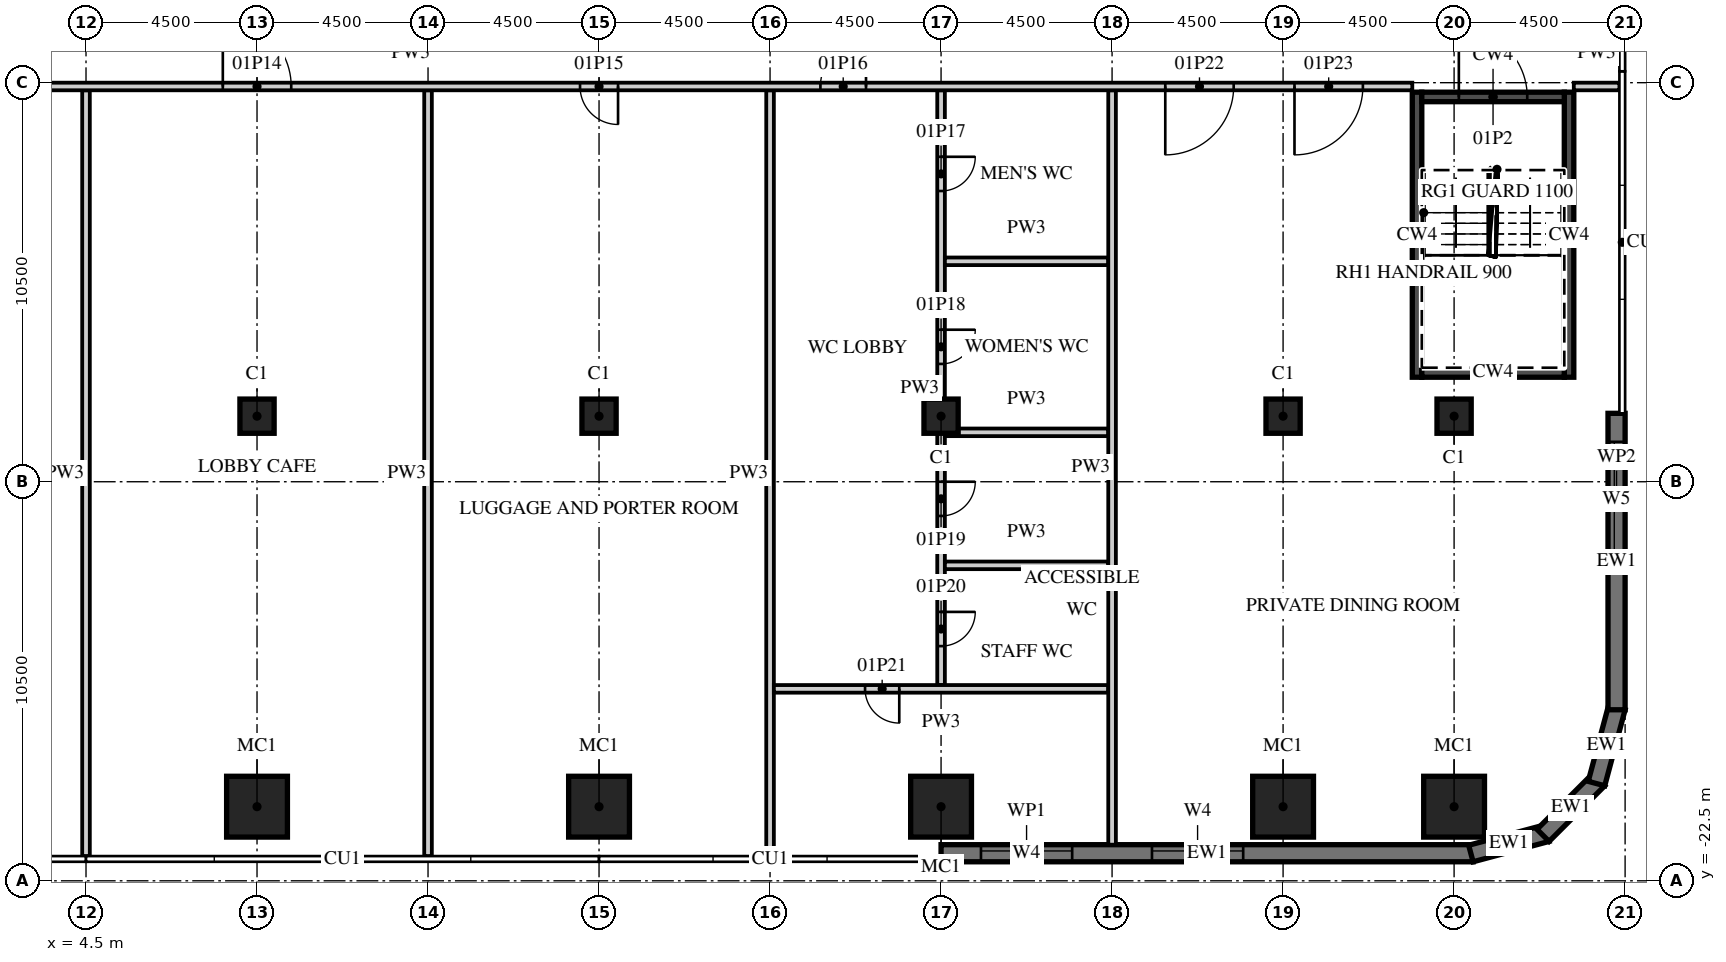
"""IFC4 building model, lengths in metres.
Left out: names, types, materials, properties, quantities, classifications, styles, units other than length and angle.
Written with IfcOpenShell. Run it as: python <this file> out.ifc"""

import sys

from ifc_helpers import new_model, si_unit, direction, frame, frame_2d, origin, origin_2d, place, context, subcontext, project, spatial, polyline, rectangle, outline, extrude, element, fill, save


model = new_model("IFC4")
c1 = context("Model", 3, precision=1e-05, world=origin(), true_north=direction((0.0, 1.0)))
c2 = subcontext(c1, "Body", "Model", "MODEL_VIEW")
j1 = project(units=[si_unit("LENGTHUNIT", "METRE"), si_unit("PLANEANGLEUNIT", "RADIAN")], contexts=[c1])
p1 = place(None, origin())
s1 = spatial("IfcSite", under=j1, at=p1, CompositionType="ELEMENT")
p2 = place(p1, origin())
s2 = spatial("IfcBuilding", under=s1, at=p2, CompositionType="ELEMENT")
p3 = place(p2, frame((0.0, 0.0, 11.0)))
s3 = spatial("IfcBuildingStorey", under=s2, at=p3, CompositionType="ELEMENT", Elevation=11.0)
for number, where, z_axis, x_axis in (
    (1, (9.0, -20.55, 0.0), (0.0, 0.0, 1.0), (1.0, 0.0, 0.0)),
    (2, (18.0, -20.55, 0.0), (0.0, 0.0, 1.0), (1.0, 0.0, 0.0)),
    (3, (27.0, -20.55, 0.0), (0.0, 0.0, 1.0), (1.0, 0.0, 0.0)),
    (4, (36.0, -20.55, 0.0), (0.0, 0.0, 1.0), (1.0, 0.0, 0.0)),
    (5, (40.5, -20.55, 0.0), (0.0, 0.0, 1.0), (1.0, 0.0, 0.0)),
):
    element("IfcColumn", number, at=place(p3, frame(where, z_axis=z_axis, x_axis=x_axis)), inside=s3, PredefinedType="COLUMN", context=c2, shape_type="SweptSolid", body=[
        extrude(rectangle(XDim=1.6, YDim=1.6, at=origin_2d()), origin(), (0.0, 0.0, 1.0), 6.0),
    ])
for number, where, z_axis, x_axis in (
    (6, (9.0, -10.275, 0.0), (0.0, 0.0, 1.0), (1.0, 0.0, 0.0)),
    (7, (18.0, -10.275, 0.0), (0.0, 0.0, 1.0), (1.0, 0.0, 0.0)),
    (8, (27.0, -10.275, 0.0), (0.0, 0.0, 1.0), (1.0, 0.0, 0.0)),
    (9, (36.0, -10.275, 0.0), (0.0, 0.0, 1.0), (1.0, 0.0, 0.0)),
    (10, (40.5, -10.275, 0.0), (0.0, 0.0, 1.0), (1.0, 0.0, 0.0)),
):
    element("IfcColumn", number, at=place(p3, frame(where, z_axis=z_axis, x_axis=x_axis)), inside=s3, PredefinedType="COLUMN", context=c2, shape_type="SweptSolid", body=[
        extrude(rectangle(XDim=0.9, YDim=0.9, at=origin_2d()), origin(), (0.0, 0.0, 1.0), 6.0),
    ])
p4 = place(p3, frame((27.0, -21.775, 0.0), z_axis=(0.0, 0.0, 1.0), x_axis=(1.0, 0.0, 0.0)))
e11 = element("IfcWall", 11, at=p4, inside=s3, PredefinedType="SOLIDWALL", context=c2, shape_type="SweptSolid", body=[
    extrude(rectangle(XDim=14.0, YDim=0.45, at=frame_2d((7.0, 0.0))), origin(), (0.0, 0.0, 1.0), 5.55),
])
p5 = place(p4, frame((1.05, 0.0, 0.9)))
e12 = element("IfcOpeningElement", 12, at=p5, cuts=e11, PredefinedType="OPENING", context=c2, shape_type="SweptSolid", body=[
    extrude(rectangle(XDim=2.4, YDim=1.8, at=frame_2d((1.2, 0.9))), frame((0.0, 0.235, 0.0), z_axis=(0.0, -1.0, 0.0), x_axis=(1.0, 0.0, 0.0)), (0.0, 0.0, 1.0), 0.47),
])
p6 = place(p4, frame((5.55, 0.0, 0.9)))
e13 = element("IfcOpeningElement", 13, at=p6, cuts=e11, PredefinedType="OPENING", context=c2, shape_type="SweptSolid", body=[
    extrude(rectangle(XDim=2.4, YDim=1.8, at=frame_2d((1.2, 0.9))), frame((0.0, 0.235, 0.0), z_axis=(0.0, -1.0, 0.0), x_axis=(1.0, 0.0, 0.0)), (0.0, 0.0, 1.0), 0.47),
])
p7 = place(p3, frame((40.942, -21.783, 0.0), z_axis=(0.0, 0.0, 1.0), x_axis=(0.965926999034, 0.25881466832, 0.0)))
e14 = element("IfcWall", 14, at=p7, inside=s3, PredefinedType="SOLIDWALL", context=c2, shape_type="SweptSolid", body=[
    extrude(outline(polyline([(0.0, -0.225), (2.071, -0.225), (1.95, 0.225), (0.121, 0.225), (0.0, -0.225)])), origin(), (0.0, 0.0, 1.0), 5.55),
])
p8 = place(p3, frame((42.841, -21.305, 0.0), z_axis=(0.0, 0.0, 1.0), x_axis=(0.707106781187, 0.707106781187, 0.0)))
e15 = element("IfcWall", 15, at=p8, inside=s3, PredefinedType="SOLIDWALL", context=c2, shape_type="SweptSolid", body=[
    extrude(outline(polyline([(0.0, -0.225), (2.071, -0.225), (1.95, 0.225), (0.121, 0.225), (0.0, -0.225)])), origin(), (0.0, 0.0, 1.0), 5.55),
])
p9 = place(p3, frame((44.247, -19.942, 0.0), z_axis=(0.0, 0.0, 1.0), x_axis=(0.25881466832, 0.965926999034, 0.0)))
e16 = element("IfcWall", 16, at=p9, inside=s3, PredefinedType="SOLIDWALL", context=c2, shape_type="SweptSolid", body=[
    extrude(outline(polyline([(-0.0, -0.225), (2.07, -0.225), (1.95, 0.225), (0.12, 0.225), (-0.0, -0.225)])), origin(), (0.0, 0.0, 1.0), 5.55),
])
p10 = place(p3, frame((44.775, -18.0, 0.0), z_axis=(0.0, 0.0, 1.0), x_axis=(0.0, 1.0, 0.0)))
e17 = element("IfcWall", 17, at=p10, inside=s3, PredefinedType="SOLIDWALL", context=c2, shape_type="SweptSolid", body=[
    extrude(rectangle(XDim=7.8, YDim=0.45, at=frame_2d((3.9, 0.0))), origin(), (0.0, 0.0, 1.0), 5.55),
])
p11 = place(p10, frame((4.05, 0.0, 0.9)))
e18 = element("IfcOpeningElement", 18, at=p11, cuts=e17, PredefinedType="OPENING", context=c2, shape_type="SweptSolid", body=[
    extrude(rectangle(XDim=3.0, YDim=1.8, at=frame_2d((1.5, 0.9))), frame((0.0, 0.235, 0.0), z_axis=(0.0, -1.0, 0.0), x_axis=(1.0, 0.0, 0.0)), (0.0, 0.0, 1.0), 0.47),
])
for number, where, z_axis, x_axis in (
    (19, (39.525, -9.25, 0.0), (0.0, 0.0, 1.0), (0.0, 1.0, 0.0)),
    (20, (43.525, -9.25, 0.0), (0.0, 0.0, 1.0), (0.0, 1.0, 0.0)),
):
    element("IfcWall", number, at=place(p3, frame(where, z_axis=z_axis, x_axis=x_axis)), inside=s3, PredefinedType="SHEAR", context=c2, shape_type="SweptSolid", body=[
        extrude(rectangle(XDim=7.5, YDim=0.25, at=frame_2d((3.75, 0.0))), origin(), (0.0, 0.0, 1.0), 5.55),
    ])
p12 = place(p3, frame((39.65, -9.125, 0.0), z_axis=(0.0, 0.0, 1.0), x_axis=(1.0, 0.0, 0.0)))
e21 = element("IfcWall", 21, at=p12, inside=s3, PredefinedType="SHEAR", context=c2, shape_type="SweptSolid", body=[
    extrude(rectangle(XDim=3.75, YDim=0.25, at=frame_2d((1.875, 0.0))), origin(), (0.0, 0.0, 1.0), 5.55),
])
p13 = place(p3, frame((39.65, -1.875, 0.0), z_axis=(0.0, 0.0, 1.0), x_axis=(1.0, 0.0, 0.0)))
e22 = element("IfcWall", 22, at=p13, inside=s3, PredefinedType="SHEAR", context=c2, shape_type="SweptSolid", body=[
    extrude(rectangle(XDim=3.75, YDim=0.25, at=frame_2d((1.875, 0.0))), origin(), (0.0, 0.0, 1.0), 5.55),
])
p14 = place(p13, frame((0.975, 0.0, 0.0)))
e23 = element("IfcOpeningElement", 23, at=p14, cuts=e22, PredefinedType="OPENING", context=c2, shape_type="SweptSolid", body=[
    extrude(rectangle(XDim=1.8, YDim=2.1, at=frame_2d((0.9, 1.05))), frame((0.0, 0.135, 0.0), z_axis=(0.0, -1.0, 0.0), x_axis=(1.0, 0.0, 0.0)), (0.0, 0.0, 1.0), 0.27),
])
for number, where, z_axis, x_axis in (
    (24, (4.5, -21.85, 0.0), (0.0, 0.0, 1.0), (0.0, 1.0, 0.0)),
    (25, (13.5, -21.85, 0.0), (0.0, 0.0, 1.0), (0.0, 1.0, 0.0)),
    (26, (22.5, -21.85, 0.0), (0.0, 0.0, 1.0), (0.0, 1.0, 0.0)),
):
    element("IfcWall", number, at=place(p3, frame(where, z_axis=z_axis, x_axis=x_axis)), inside=s3, PredefinedType="PARTITIONING", context=c2, shape_type="SweptSolid", body=[
        extrude(rectangle(XDim=20.15, YDim=0.2, at=frame_2d((10.075, 0.0))), origin(), (0.0, 0.0, 1.0), 5.55),
    ])
p15 = place(p3, frame((27.0, -17.35, 0.0), z_axis=(0.0, 0.0, 1.0), x_axis=(0.0, 1.0, 0.0)))
e27 = element("IfcWall", 27, at=p15, inside=s3, PredefinedType="PARTITIONING", context=c2, shape_type="SweptSolid", body=[
    extrude(rectangle(XDim=15.65, YDim=0.2, at=frame_2d((7.825, 0.0))), origin(), (0.0, 0.0, 1.0), 5.55),
])
p16 = place(p15, frame((13.0, 0.0, 0.0)))
e28 = element("IfcOpeningElement", 28, at=p16, cuts=e27, PredefinedType="OPENING", context=c2, shape_type="SweptSolid", body=[
    extrude(rectangle(XDim=0.9, YDim=2.1, at=frame_2d((0.45, 1.05))), frame((0.0, 0.11, 0.0), z_axis=(0.0, -1.0, 0.0), x_axis=(1.0, 0.0, 0.0)), (0.0, 0.0, 1.0), 0.22),
])
p17 = place(p15, frame((8.45, 0.0, 0.0)))
e29 = element("IfcOpeningElement", 29, at=p17, cuts=e27, PredefinedType="OPENING", context=c2, shape_type="SweptSolid", body=[
    extrude(rectangle(XDim=0.9, YDim=2.1, at=frame_2d((0.45, 1.05))), frame((0.0, 0.11, 0.0), z_axis=(0.0, -1.0, 0.0), x_axis=(1.0, 0.0, 0.0)), (0.0, 0.0, 1.0), 0.22),
])
p18 = place(p15, frame((4.45, 0.0, 0.0)))
e30 = element("IfcOpeningElement", 30, at=p18, cuts=e27, PredefinedType="OPENING", context=c2, shape_type="SweptSolid", body=[
    extrude(rectangle(XDim=0.9, YDim=2.1, at=frame_2d((0.45, 1.05))), frame((0.0, 0.11, 0.0), z_axis=(0.0, -1.0, 0.0), x_axis=(1.0, 0.0, 0.0)), (0.0, 0.0, 1.0), 0.22),
])
p19 = place(p15, frame((1.025, 0.0, 0.0)))
e31 = element("IfcOpeningElement", 31, at=p19, cuts=e27, PredefinedType="OPENING", context=c2, shape_type="SweptSolid", body=[
    extrude(rectangle(XDim=0.9, YDim=2.1, at=frame_2d((0.45, 1.05))), frame((0.0, 0.11, 0.0), z_axis=(0.0, -1.0, 0.0), x_axis=(1.0, 0.0, 0.0)), (0.0, 0.0, 1.0), 0.22),
])
for number, where, z_axis, x_axis in (
    (32, (27.1, -6.2, 0.0), (0.0, 0.0, 1.0), (1.0, 0.0, 0.0)),
    (33, (27.1, -10.7, 0.0), (0.0, 0.0, 1.0), (1.0, 0.0, 0.0)),
    (34, (27.1, -14.2, 0.0), (0.0, 0.0, 1.0), (1.0, 0.0, 0.0)),
):
    element("IfcWall", number, at=place(p3, frame(where, z_axis=z_axis, x_axis=x_axis)), inside=s3, PredefinedType="PARTITIONING", context=c2, shape_type="SweptSolid", body=[
        extrude(rectangle(XDim=4.3, YDim=0.2, at=frame_2d((2.15, 0.0))), origin(), (0.0, 0.0, 1.0), 5.55),
    ])
p20 = place(p3, frame((22.6, -17.45, 0.0), z_axis=(0.0, 0.0, 1.0), x_axis=(1.0, 0.0, 0.0)))
e35 = element("IfcWall", 35, at=p20, inside=s3, PredefinedType="PARTITIONING", context=c2, shape_type="SweptSolid", body=[
    extrude(rectangle(XDim=8.8, YDim=0.2, at=frame_2d((4.4, 0.0))), origin(), (0.0, 0.0, 1.0), 5.55),
])
p21 = place(p20, frame((2.4, 0.0, 0.0)))
e36 = element("IfcOpeningElement", 36, at=p21, cuts=e35, PredefinedType="OPENING", context=c2, shape_type="SweptSolid", body=[
    extrude(rectangle(XDim=0.9, YDim=2.1, at=frame_2d((0.45, 1.05))), frame((0.0, 0.11, 0.0), z_axis=(0.0, -1.0, 0.0), x_axis=(1.0, 0.0, 0.0)), (0.0, 0.0, 1.0), 0.22),
])
p22 = place(p3, frame((31.5, -21.55, 0.0), z_axis=(0.0, 0.0, 1.0), x_axis=(0.0, 1.0, 0.0)))
e37 = element("IfcWall", 37, at=p22, inside=s3, PredefinedType="PARTITIONING", context=c2, shape_type="SweptSolid", body=[
    extrude(rectangle(XDim=19.85, YDim=0.2, at=frame_2d((9.925, 0.0))), origin(), (0.0, 0.0, 1.0), 5.55),
])
p23 = place(p3, frame((-13.3, -1.6, 0.0), z_axis=(0.0, 0.0, 1.0), x_axis=(1.0, 0.0, 0.0)))
e38 = element("IfcWall", 38, at=p23, inside=s3, PredefinedType="PARTITIONING", context=c2, shape_type="SweptSolid", body=[
    extrude(rectangle(XDim=52.7, YDim=0.2, at=frame_2d((26.35, 0.0))), origin(), (0.0, 0.0, 1.0), 5.55),
])
p24 = place(p23, frame((4.41, 0.0, 0.0)))
e39 = element("IfcOpeningElement", 39, at=p24, cuts=e38, PredefinedType="OPENING", context=c2, shape_type="SweptSolid", body=[
    extrude(rectangle(XDim=1.8, YDim=2.1, at=frame_2d((0.9, 1.05))), frame((0.0, 0.11, 0.0), z_axis=(0.0, -1.0, 0.0), x_axis=(1.0, 0.0, 0.0)), (0.0, 0.0, 1.0), 0.22),
])
p25 = place(p23, frame((11.49, 0.0, 0.0)))
e40 = element("IfcOpeningElement", 40, at=p25, cuts=e38, PredefinedType="OPENING", context=c2, shape_type="SweptSolid", body=[
    extrude(rectangle(XDim=1.8, YDim=2.1, at=frame_2d((0.9, 1.05))), frame((0.0, 0.11, 0.0), z_axis=(0.0, -1.0, 0.0), x_axis=(1.0, 0.0, 0.0)), (0.0, 0.0, 1.0), 0.22),
])
p26 = place(p23, frame((21.4, 0.0, 0.0)))
e41 = element("IfcOpeningElement", 41, at=p26, cuts=e38, PredefinedType="OPENING", context=c2, shape_type="SweptSolid", body=[
    extrude(rectangle(XDim=1.8, YDim=2.1, at=frame_2d((0.9, 1.05))), frame((0.0, 0.11, 0.0), z_axis=(0.0, -1.0, 0.0), x_axis=(1.0, 0.0, 0.0)), (0.0, 0.0, 1.0), 0.22),
])
p27 = place(p23, frame((30.8, 0.0, 0.0)))
e42 = element("IfcOpeningElement", 42, at=p27, cuts=e38, PredefinedType="OPENING", context=c2, shape_type="SweptSolid", body=[
    extrude(rectangle(XDim=1.0, YDim=2.1, at=frame_2d((0.5, 1.05))), frame((0.0, 0.11, 0.0), z_axis=(0.0, -1.0, 0.0), x_axis=(1.0, 0.0, 0.0)), (0.0, 0.0, 1.0), 0.22),
])
p28 = place(p23, frame((37.125, 0.0, 0.0)))
e43 = element("IfcOpeningElement", 43, at=p28, cuts=e38, PredefinedType="OPENING", context=c2, shape_type="SweptSolid", body=[
    extrude(rectangle(XDim=1.2, YDim=2.1, at=frame_2d((0.6, 1.05))), frame((0.0, 0.11, 0.0), z_axis=(0.0, -1.0, 0.0), x_axis=(1.0, 0.0, 0.0)), (0.0, 0.0, 1.0), 0.22),
])
p29 = place(p23, frame((46.2, 0.0, 0.0)))
e44 = element("IfcOpeningElement", 44, at=p29, cuts=e38, PredefinedType="OPENING", context=c2, shape_type="SweptSolid", body=[
    extrude(rectangle(XDim=1.8, YDim=2.1, at=frame_2d((0.9, 1.05))), frame((0.0, 0.11, 0.0), z_axis=(0.0, -1.0, 0.0), x_axis=(1.0, 0.0, 0.0)), (0.0, 0.0, 1.0), 0.22),
])
p30 = place(p23, frame((49.6, 0.0, 0.0)))
e45 = element("IfcOpeningElement", 45, at=p30, cuts=e38, PredefinedType="OPENING", context=c2, shape_type="SweptSolid", body=[
    extrude(rectangle(XDim=1.8, YDim=2.1, at=frame_2d((0.9, 1.05))), frame((0.0, 0.11, 0.0), z_axis=(0.0, -1.0, 0.0), x_axis=(1.0, 0.0, 0.0)), (0.0, 0.0, 1.0), 0.22),
])
p31 = place(p3, frame((43.65, -1.6, 0.0), z_axis=(0.0, 0.0, 1.0), x_axis=(1.0, 0.0, 0.0)))
e46 = element("IfcWall", 46, at=p31, inside=s3, PredefinedType="PARTITIONING", context=c2, shape_type="SweptSolid", body=[
    extrude(rectangle(XDim=1.2, YDim=0.2, at=frame_2d((0.6, 0.0))), origin(), (0.0, 0.0, 1.0), 5.55),
])
p32 = place(p5, origin())
e47 = element("IfcWindow", 47, at=p32, inside=s3, PartitioningType="SINGLE_PANEL", PredefinedType="WINDOW", context=c2, shape_type="SweptSolid", body=[
    extrude(rectangle(XDim=2.4, YDim=1.8, at=frame_2d((1.2, 0.9))), frame((0.0, 0.09, 0.0), z_axis=(0.0, -1.0, 0.0), x_axis=(1.0, 0.0, 0.0)), (0.0, 0.0, 1.0), 0.06),
])
fill(e12, e47)
p33 = place(p6, origin())
e48 = element("IfcWindow", 48, at=p33, inside=s3, PartitioningType="SINGLE_PANEL", PredefinedType="WINDOW", context=c2, shape_type="SweptSolid", body=[
    extrude(rectangle(XDim=2.4, YDim=1.8, at=frame_2d((1.2, 0.9))), frame((0.0, 0.09, 0.0), z_axis=(0.0, -1.0, 0.0), x_axis=(1.0, 0.0, 0.0)), (0.0, 0.0, 1.0), 0.06),
])
fill(e13, e48)
p34 = place(p11, origin())
e49 = element("IfcWindow", 49, at=p34, inside=s3, PartitioningType="SINGLE_PANEL", PredefinedType="WINDOW", context=c2, shape_type="SweptSolid", body=[
    extrude(rectangle(XDim=3.0, YDim=1.8, at=frame_2d((1.5, 0.9))), frame((0.0, 0.09, 0.0), z_axis=(0.0, -1.0, 0.0), x_axis=(1.0, 0.0, 0.0)), (0.0, 0.0, 1.0), 0.06),
])
fill(e18, e49)
p35 = place(p14, origin())
e50 = element("IfcDoor", 50, at=p35, inside=s3, OperationType="DOUBLE_DOOR_DOUBLE_SWING", PredefinedType="DOOR", context=c2, shape_type="SweptSolid", body=[
    extrude(rectangle(XDim=1.8, YDim=2.1, at=frame_2d((0.9, 1.05))), frame((0.0, 0.025, 0.0), z_axis=(0.0, -1.0, 0.0), x_axis=(1.0, 0.0, 0.0)), (0.0, 0.0, 1.0), 0.05),
])
fill(e23, e50)
p36 = place(p26, origin())
e51 = element("IfcDoor", 51, at=p36, inside=s3, OperationType="DOUBLE_DOOR_DOUBLE_SWING", PredefinedType="DOOR", context=c2, shape_type="SweptSolid", body=[
    extrude(rectangle(XDim=1.8, YDim=2.1, at=frame_2d((0.9, 1.05))), frame((0.0, 0.025, 0.0), z_axis=(0.0, -1.0, 0.0), x_axis=(1.0, 0.0, 0.0)), (0.0, 0.0, 1.0), 0.05),
])
fill(e41, e51)
p37 = place(p27, origin())
e52 = element("IfcDoor", 52, at=p37, inside=s3, OperationType="SINGLE_SWING_RIGHT", PredefinedType="DOOR", context=c2, shape_type="SweptSolid", body=[
    extrude(rectangle(XDim=1.0, YDim=2.1, at=frame_2d((0.5, 1.05))), frame((0.0, 0.025, 0.0), z_axis=(0.0, -1.0, 0.0), x_axis=(1.0, 0.0, 0.0)), (0.0, 0.0, 1.0), 0.05),
])
fill(e42, e52)
p38 = place(p28, origin())
e53 = element("IfcDoor", 53, at=p38, inside=s3, OperationType="SINGLE_SWING_RIGHT", PredefinedType="DOOR", context=c2, shape_type="SweptSolid", body=[
    extrude(rectangle(XDim=1.2, YDim=2.1, at=frame_2d((0.6, 1.05))), frame((0.0, 0.025, 0.0), z_axis=(0.0, -1.0, 0.0), x_axis=(1.0, 0.0, 0.0)), (0.0, 0.0, 1.0), 0.05),
])
fill(e43, e53)
p39 = place(p16, origin())
e54 = element("IfcDoor", 54, at=p39, inside=s3, OperationType="SINGLE_SWING_RIGHT", PredefinedType="DOOR", context=c2, shape_type="SweptSolid", body=[
    extrude(rectangle(XDim=0.9, YDim=2.1, at=frame_2d((0.45, 1.05))), frame((0.0, 0.025, 0.0), z_axis=(0.0, -1.0, 0.0), x_axis=(1.0, 0.0, 0.0)), (0.0, 0.0, 1.0), 0.05),
])
fill(e28, e54)
p40 = place(p17, origin())
e55 = element("IfcDoor", 55, at=p40, inside=s3, OperationType="SINGLE_SWING_RIGHT", PredefinedType="DOOR", context=c2, shape_type="SweptSolid", body=[
    extrude(rectangle(XDim=0.9, YDim=2.1, at=frame_2d((0.45, 1.05))), frame((0.0, 0.025, 0.0), z_axis=(0.0, -1.0, 0.0), x_axis=(1.0, 0.0, 0.0)), (0.0, 0.0, 1.0), 0.05),
])
fill(e29, e55)
p41 = place(p18, origin())
e56 = element("IfcDoor", 56, at=p41, inside=s3, OperationType="SINGLE_SWING_RIGHT", PredefinedType="DOOR", context=c2, shape_type="SweptSolid", body=[
    extrude(rectangle(XDim=0.9, YDim=2.1, at=frame_2d((0.45, 1.05))), frame((0.0, 0.025, 0.0), z_axis=(0.0, -1.0, 0.0), x_axis=(1.0, 0.0, 0.0)), (0.0, 0.0, 1.0), 0.05),
])
fill(e30, e56)
p42 = place(p19, origin())
e57 = element("IfcDoor", 57, at=p42, inside=s3, OperationType="SINGLE_SWING_RIGHT", PredefinedType="DOOR", context=c2, shape_type="SweptSolid", body=[
    extrude(rectangle(XDim=0.9, YDim=2.1, at=frame_2d((0.45, 1.05))), frame((0.0, 0.025, 0.0), z_axis=(0.0, -1.0, 0.0), x_axis=(1.0, 0.0, 0.0)), (0.0, 0.0, 1.0), 0.05),
])
fill(e31, e57)
p43 = place(p21, origin())
e58 = element("IfcDoor", 58, at=p43, inside=s3, OperationType="SINGLE_SWING_RIGHT", PredefinedType="DOOR", context=c2, shape_type="SweptSolid", body=[
    extrude(rectangle(XDim=0.9, YDim=2.1, at=frame_2d((0.45, 1.05))), frame((0.0, 0.025, 0.0), z_axis=(0.0, -1.0, 0.0), x_axis=(1.0, 0.0, 0.0)), (0.0, 0.0, 1.0), 0.05),
])
fill(e36, e58)
p44 = place(p29, origin())
e59 = element("IfcDoor", 59, at=p44, inside=s3, OperationType="DOUBLE_DOOR_DOUBLE_SWING", PredefinedType="DOOR", context=c2, shape_type="SweptSolid", body=[
    extrude(rectangle(XDim=1.8, YDim=2.1, at=frame_2d((0.9, 1.05))), frame((0.0, 0.025, 0.0), z_axis=(0.0, -1.0, 0.0), x_axis=(1.0, 0.0, 0.0)), (0.0, 0.0, 1.0), 0.05),
])
fill(e44, e59)
p45 = place(p30, origin())
e60 = element("IfcDoor", 60, at=p45, inside=s3, OperationType="DOUBLE_DOOR_DOUBLE_SWING", PredefinedType="DOOR", context=c2, shape_type="SweptSolid", body=[
    extrude(rectangle(XDim=1.8, YDim=2.1, at=frame_2d((0.9, 1.05))), frame((0.0, 0.025, 0.0), z_axis=(0.0, -1.0, 0.0), x_axis=(1.0, 0.0, 0.0)), (0.0, 0.0, 1.0), 0.05),
])
fill(e45, e60)
save(model, sys.argv[1])
